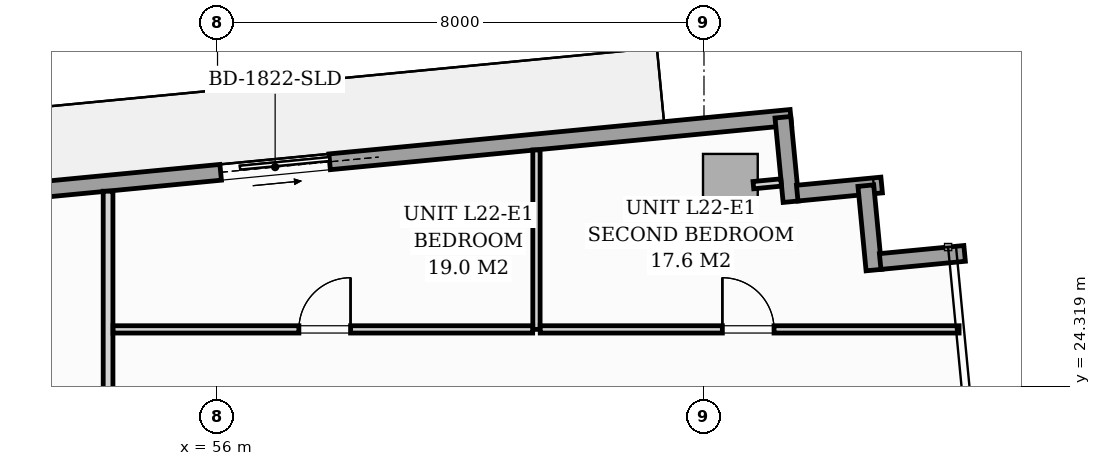
"""IFC4 building model, lengths in metres.
Left out: names, types, materials, properties, quantities, classifications, styles, units other than length and angle.
Written with IfcOpenShell. Run it as: python <this file> out.ifc"""

import sys

from ifc_helpers import new_model, si_unit, direction, frame, frame_2d, origin, origin_2d, place, context, subcontext, project, spatial, rectangle, extrude, source, transform, mapped, element, fill, save


model = new_model("IFC4")
c1 = context("Model", 3, precision=1e-05, world=origin(), true_north=direction((0.0, 1.0)))
c2 = subcontext(c1, "Body", "Model", "MODEL_VIEW")
j1 = project(units=[si_unit("LENGTHUNIT", "METRE"), si_unit("PLANEANGLEUNIT", "RADIAN")], contexts=[c1])
p1 = place(None, origin())
s1 = spatial("IfcSite", under=j1, at=p1, CompositionType="ELEMENT")
p2 = place(p1, origin())
s2 = spatial("IfcBuilding", under=s1, at=p2, CompositionType="ELEMENT")
p3 = place(p2, frame((0.0, 0.0, 81.0)))
s3 = spatial("IfcBuildingStorey", under=s2, at=p3, CompositionType="ELEMENT", Elevation=81.0)
m1 = source(origin(), c2, "Body", "SweptSolid", [
    extrude(rectangle(XDim=0.9, YDim=1.1, at=origin_2d()), origin(), (0.0, 0.0, 1.0), 3.196),
])
p4 = place(p3, frame((64.434, 27.591, 0.002), z_axis=(0.0, 0.0, 1.0), x_axis=(0.995396198367, 0.09584575252, 0.0)))
e1 = element("IfcColumn", 1, at=p4, inside=s3, PredefinedType="COLUMN", context=c2, shape_type="MappedRepresentation", body=[
    mapped(m1, transform((0.0, 0.0, 0.0), scale=1.0)),
])
p5 = place(p3, frame((46.406, 26.91, 0.0), z_axis=(0.0, 0.0, 1.0), x_axis=(0.995396638587, 0.095841180552, 0.0)))
e2 = element("IfcWall", 2, at=p5, inside=s3, PredefinedType="STANDARD", context=c2, shape_type="SweptSolid", body=[
    extrude(rectangle(XDim=19.11, YDim=0.26, at=frame_2d((9.555, 0.0))), origin(), (0.0, 0.0, 1.0), 2.94),
])
p6 = place(p5, frame((9.69, 0.0, 0.0)))
e3 = element("IfcOpeningElement", 3, at=p6, cuts=e2, PredefinedType="OPENING", context=c2, shape_type="SweptSolid", body=[
    extrude(rectangle(XDim=1.8, YDim=2.06, at=frame_2d((0.9, 1.03))), frame((0.0, 0.14, 0.0), z_axis=(0.0, -1.0, 0.0), x_axis=(1.0, 0.0, 0.0)), (0.0, 0.0, 1.0), 0.28),
])
p7 = place(p5, frame((0.7, 0.0, 0.65)))
e4 = element("IfcOpeningElement", 4, at=p7, cuts=e2, PredefinedType="OPENING", context=c2, shape_type="SweptSolid", body=[
    extrude(rectangle(XDim=1.6, YDim=1.5, at=frame_2d((0.8, 0.75))), frame((0.0, 0.14, 0.0), z_axis=(0.0, -1.0, 0.0), x_axis=(1.0, 0.0, 0.0)), (0.0, 0.0, 1.0), 0.28),
])
for number, where, z_axis, x_axis in (
    (5, (65.298, 28.744, 0.0), (0.0, 0.0, 1.0), (0.096, -0.995, 0.0)),
    (6, (65.533, 27.496, 0.0), (0.0, 0.0, 1.0), (0.995, 0.096, 0.0)),
):
    element("IfcWall", number, at=place(p3, frame(where, z_axis=z_axis, x_axis=x_axis)), inside=s3, PredefinedType="STANDARD", context=c2, shape_type="SweptSolid", body=[
        extrude(rectangle(XDim=1.395, YDim=0.26, at=frame_2d((0.698, 0.0))), origin(), (0.0, 0.0, 1.0), 2.94),
    ])
p8 = place(p3, frame((66.662, 27.619, 0.0), z_axis=(0.0, 0.0, 1.0), x_axis=(0.095742423056, -0.99540614245, 0.0)))
e7 = element("IfcWall", 7, at=p8, inside=s3, PredefinedType="STANDARD", context=c2, shape_type="SweptSolid", body=[
    extrude(rectangle(XDim=1.395, YDim=0.26, at=frame_2d((0.697, 0.0))), origin(), (0.0, 0.0, 1.0), 2.94),
])
p9 = place(p3, frame((66.897, 26.371, 0.0), z_axis=(0.0, 0.0, 1.0), x_axis=(0.995391056452, 0.09589913835, 0.0)))
e8 = element("IfcWall", 8, at=p9, inside=s3, PredefinedType="STANDARD", context=c2, shape_type="SweptSolid", body=[
    extrude(rectangle(XDim=1.395, YDim=0.26, at=frame_2d((0.698, 0.0))), origin(), (0.0, 0.0, 1.0), 2.94),
])
p10 = place(p3, frame((54.2, 12.432, 0.0), z_axis=(0.0, 0.0, 1.0), x_axis=(0.0, 1.0, 0.0)))
e9 = element("IfcWall", 9, at=p10, inside=s3, PredefinedType="PARTITIONING", context=c2, shape_type="SweptSolid", body=[
    extrude(rectangle(XDim=15.095, YDim=0.16, at=frame_2d((7.548, 0.0))), origin(), (0.0, 0.0, 1.0), 2.94),
])
p11 = place(p10, frame((0.429, 0.0, 0.0)))
e10 = element("IfcOpeningElement", 10, at=p11, cuts=e9, PredefinedType="OPENING", context=c2, shape_type="SweptSolid", body=[
    extrude(rectangle(XDim=0.95, YDim=2.06, at=frame_2d((0.475, 1.03))), frame((0.0, 0.09, 0.0), z_axis=(0.0, -1.0, 0.0), x_axis=(1.0, 0.0, 0.0)), (0.0, 0.0, 1.0), 0.18),
])
p12 = place(p3, frame((61.245, 25.255, 0.0), z_axis=(0.0, 0.0, 1.0), x_axis=(0.0, 1.0, 0.0)))
e11 = element("IfcWall", 11, at=p12, inside=s3, PredefinedType="PARTITIONING", context=c2, shape_type="SweptSolid", body=[
    extrude(rectangle(XDim=2.951, YDim=0.12, at=frame_2d((1.476, 0.0))), origin(), (0.0, 0.0, 1.0), 2.94),
])
p13 = place(p3, frame((54.282, 25.255, 0.0), z_axis=(0.0, 0.0, 1.0), x_axis=(1.0, 0.0, 0.0)))
e12 = element("IfcWall", 12, at=p13, inside=s3, PredefinedType="PARTITIONING", context=c2, shape_type="SweptSolid", body=[
    extrude(rectangle(XDim=6.901, YDim=0.12, at=frame_2d((3.451, 0.0))), origin(), (0.0, 0.0, 1.0), 2.94),
])
p14 = place(p13, frame((3.056, 0.0, 0.0)))
e13 = element("IfcOpeningElement", 13, at=p14, cuts=e12, PredefinedType="OPENING", context=c2, shape_type="SweptSolid", body=[
    extrude(rectangle(XDim=0.85, YDim=2.05, at=frame_2d((0.425, 1.025))), frame((0.0, 0.07, 0.0), z_axis=(0.0, -1.0, 0.0), x_axis=(1.0, 0.0, 0.0)), (0.0, 0.0, 1.0), 0.14),
])
p15 = place(p3, frame((61.307, 25.255, 0.0), z_axis=(0.0, 0.0, 1.0), x_axis=(1.0, 0.0, 0.0)))
e14 = element("IfcWall", 14, at=p15, inside=s3, PredefinedType="PARTITIONING", context=c2, shape_type="SweptSolid", body=[
    extrude(rectangle(XDim=6.888, YDim=0.12, at=frame_2d((3.444, 0.0))), origin(), (0.0, 0.0, 1.0), 2.94),
])
p16 = place(p15, frame((2.995, 0.0, 0.0)))
e15 = element("IfcOpeningElement", 15, at=p16, cuts=e14, PredefinedType="OPENING", context=c2, shape_type="SweptSolid", body=[
    extrude(rectangle(XDim=0.85, YDim=2.05, at=frame_2d((0.425, 1.025))), frame((0.0, 0.07, 0.0), z_axis=(0.0, -1.0, 0.0), x_axis=(1.0, 0.0, 0.0)), (0.0, 0.0, 1.0), 0.14),
])
p17 = place(p3, frame((64.812, 27.627, 0.0), z_axis=(0.0, 0.0, 1.0), x_axis=(0.995389482415, 0.095915474751, 0.0)))
e16 = element("IfcWall", 16, at=p17, inside=s3, PredefinedType="PARTITIONING", context=c2, shape_type="SweptSolid", body=[
    extrude(rectangle(XDim=0.458, YDim=0.12, at=frame_2d((0.229, 0.0))), origin(), (0.0, 0.0, 1.0), 2.94),
])
m2 = source(origin(), c2, "Body", "SweptSolid", [
    extrude(rectangle(XDim=1.8, YDim=2.06, at=frame_2d((0.9, 1.03))), frame((0.0, 0.025, 0.0), z_axis=(0.0, -1.0, 0.0), x_axis=(1.0, 0.0, 0.0)), (0.0, 0.0, 1.0), 0.05),
])
p18 = place(p6, origin())
e17 = element("IfcDoor", 17, at=p18, inside=s3, OperationType="SLIDING_TO_RIGHT", PredefinedType="DOOR", context=c2, shape_type="MappedRepresentation", body=[
    mapped(m2, transform((0.0, 0.0, 0.0), scale=1.0)),
])
fill(e3, e17)
m3 = source(origin(), c2, "Body", "SweptSolid", [
    extrude(rectangle(XDim=0.85, YDim=2.05, at=frame_2d((0.425, 1.025))), frame((0.0, 0.025, 0.0), z_axis=(0.0, -1.0, 0.0), x_axis=(1.0, 0.0, 0.0)), (0.0, 0.0, 1.0), 0.05),
])
p19 = place(p14, origin())
e18 = element("IfcDoor", 18, at=p19, inside=s3, OperationType="SINGLE_SWING_RIGHT", PredefinedType="DOOR", context=c2, shape_type="MappedRepresentation", body=[
    mapped(m3, transform((0.0, 0.0, 0.0), scale=1.0)),
])
fill(e13, e18)
p20 = place(p16, origin())
e19 = element("IfcDoor", 19, at=p20, inside=s3, OperationType="SINGLE_SWING_LEFT", PredefinedType="DOOR", context=c2, shape_type="MappedRepresentation", body=[
    mapped(m3, transform((0.0, 0.0, 0.0), scale=1.0)),
])
fill(e15, e19)
save(model, sys.argv[1])
